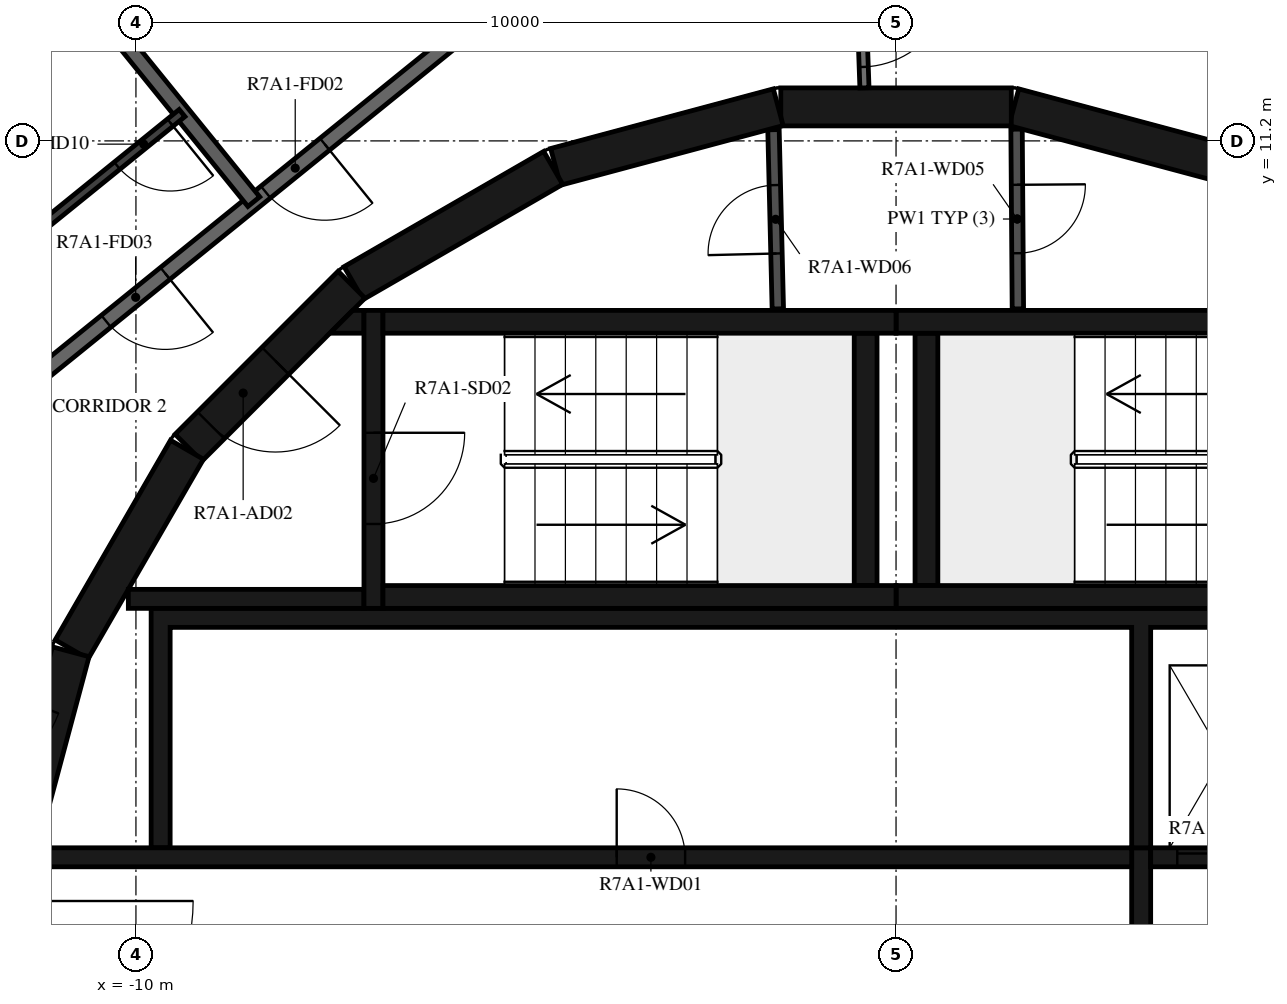
"""IFC4 building model, lengths in metres.
Left out: names, types, materials, properties, quantities, classifications, styles, units other than length and angle.
Written with IfcOpenShell. Run it as: python <this file> out.ifc"""

import sys

from ifc_helpers import new_model, si_unit, direction, frame, frame_2d, origin, place, context, subcontext, project, spatial, polyline, rectangle, outline, extrude, element, fill, save


model = new_model("IFC4")
c1 = context("Model", 3, precision=1e-05, world=origin(), true_north=direction((0.0, 1.0)))
c2 = subcontext(c1, "Body", "Model", "MODEL_VIEW")
j1 = project(units=[si_unit("LENGTHUNIT", "METRE"), si_unit("PLANEANGLEUNIT", "RADIAN")], contexts=[c1])
p1 = place(None, origin())
s1 = spatial("IfcSite", under=j1, at=p1, CompositionType="ELEMENT")
p2 = place(p1, origin())
s2 = spatial("IfcBuilding", under=s1, at=p2, CompositionType="ELEMENT")
p3 = place(p2, frame((0.0, 0.0, 266.9)))
s3 = spatial("IfcBuildingStorey", under=s2, at=p3, CompositionType="ELEMENT", Elevation=266.9)
for number, where, z_axis, x_axis in (
    (1, (4.479, 10.858, 0.0), (0.0, 0.0, 1.0), (-0.966, 0.259, 0.0)),
    (2, (1.516, 11.647, 0.0), (0.0, 0.0, 1.0), (-1.0, 0.0, 0.0)),
    (3, (-1.55, 11.643, 0.0), (0.0, 0.0, 1.0), (-0.966, -0.259, 0.0)),
    (4, (-4.51, 10.845, 0.0), (0.0, 0.0, 1.0), (-0.866, -0.5, 0.0)),
):
    element("IfcWall", number, at=place(p3, frame(where, z_axis=z_axis, x_axis=x_axis)), inside=s3, PredefinedType="SHEAR", context=c2, shape_type="SweptSolid", body=[
        extrude(rectangle(XDim=3.033, YDim=0.5, at=frame_2d((1.516, 0.0))), origin(), (0.0, 0.0, 1.0), 3.12),
    ])
p4 = place(p3, frame((-7.164, 9.308, 0.0), z_axis=(0.0, 0.0, 1.0), x_axis=(-0.707106781187, -0.707106781187, 0.0)))
e5 = element("IfcWall", 5, at=p4, inside=s3, PredefinedType="SHEAR", context=c2, shape_type="SweptSolid", body=[
    extrude(rectangle(XDim=3.032, YDim=0.5, at=frame_2d((1.516, 0.0))), origin(), (0.0, 0.0, 1.0), 3.12),
])
p5 = place(p4, frame((1.416, 0.0, 0.0)))
e6 = element("IfcOpeningElement", 6, at=p5, cuts=e5, PredefinedType="OPENING", context=c2, shape_type="SweptSolid", body=[
    extrude(rectangle(XDim=1.2, YDim=2.1, at=frame_2d((0.6, 1.05))), frame((0.0, 0.26, 0.0), z_axis=(0.0, -1.0, 0.0), x_axis=(1.0, 0.0, 0.0)), (0.0, 0.0, 1.0), 0.52),
])
for number, where, z_axis, x_axis in (
    (7, (-9.329, 7.137, 0.0), (0.0, 0.0, 1.0), (-0.5, -0.866, 0.0)),
    (8, (-10.858, 4.479, 0.0), (0.0, 0.0, 1.0), (-0.259, -0.966, 0.0)),
):
    element("IfcWall", number, at=place(p3, frame(where, z_axis=z_axis, x_axis=x_axis)), inside=s3, PredefinedType="SHEAR", context=c2, shape_type="SweptSolid", body=[
        extrude(rectangle(XDim=3.033, YDim=0.5, at=frame_2d((1.516, 0.0))), origin(), (0.0, 0.0, 1.0), 3.12),
    ])
for number, where, z_axis, x_axis in (
    (9, (0.0, 5.2, 0.0), (0.0, 0.0, 1.0), (1.0, 0.0, 0.0)),
    (10, (0.0, 8.82, 0.0), (0.0, 0.0, 1.0), (1.0, 0.0, 0.0)),
):
    element("IfcWall", number, at=place(p3, frame(where, z_axis=z_axis, x_axis=x_axis)), inside=s3, PredefinedType="SHEAR", context=c2, shape_type="SweptSolid", body=[
        extrude(rectangle(XDim=6.75, YDim=0.3, at=frame_2d((3.375, 0.0))), origin(), (0.0, 0.0, 1.0), 3.12),
    ])
p6 = place(p3, frame((0.4, 5.35, 0.0), z_axis=(0.0, 0.0, 1.0), x_axis=(0.0, 1.0, 0.0)))
e11 = element("IfcWall", 11, at=p6, inside=s3, PredefinedType="SHEAR", context=c2, shape_type="SweptSolid", body=[
    extrude(rectangle(XDim=3.32, YDim=0.3, at=frame_2d((1.66, 0.0))), origin(), (0.0, 0.0, 1.0), 3.12),
])
for number, where, z_axis, x_axis in (
    (12, (-6.75, 5.2, 0.0), (0.0, 0.0, 1.0), (1.0, 0.0, 0.0)),
    (13, (-6.75, 8.82, 0.0), (0.0, 0.0, 1.0), (1.0, 0.0, 0.0)),
):
    element("IfcWall", number, at=place(p3, frame(where, z_axis=z_axis, x_axis=x_axis)), inside=s3, PredefinedType="SHEAR", context=c2, shape_type="SweptSolid", body=[
        extrude(rectangle(XDim=6.75, YDim=0.3, at=frame_2d((3.375, 0.0))), origin(), (0.0, 0.0, 1.0), 3.12),
    ])
p7 = place(p3, frame((-0.4, 5.35, 0.0), z_axis=(0.0, 0.0, 1.0), x_axis=(0.0, 1.0, 0.0)))
e14 = element("IfcWall", 14, at=p7, inside=s3, PredefinedType="SHEAR", context=c2, shape_type="SweptSolid", body=[
    extrude(rectangle(XDim=3.32, YDim=0.3, at=frame_2d((1.66, 0.0))), origin(), (0.0, 0.0, 1.0), 3.12),
])
p8 = place(p3, frame((-6.875, 8.97, 0.0), z_axis=(0.0, 0.0, 1.0), x_axis=(0.0, -1.0, 0.0)))
e15 = element("IfcWall", 15, at=p8, inside=s3, PredefinedType="SHEAR", context=c2, shape_type="SweptSolid", body=[
    extrude(rectangle(XDim=3.92, YDim=0.25, at=frame_2d((1.96, 0.0))), origin(), (0.0, 0.0, 1.0), 3.12),
])
p9 = place(p8, frame((1.61, 0.0, 0.0)))
e16 = element("IfcOpeningElement", 16, at=p9, cuts=e15, PredefinedType="OPENING", context=c2, shape_type="SweptSolid", body=[
    extrude(rectangle(XDim=1.2, YDim=2.1, at=frame_2d((0.6, 1.05))), frame((0.0, 0.135, 0.0), z_axis=(0.0, -1.0, 0.0), x_axis=(1.0, 0.0, 0.0)), (0.0, 0.0, 1.0), 0.27),
])
p10 = place(p3, frame((-7.0, 5.175, 0.0), z_axis=(0.0, 0.0, 1.0), x_axis=(-1.0, 0.0, 0.0)))
e17 = element("IfcWall", 17, at=p10, inside=s3, PredefinedType="SHEAR", context=c2, shape_type="SweptSolid", body=[
    extrude(rectangle(XDim=3.1, YDim=0.25, at=frame_2d((1.55, 0.0))), origin(), (0.0, 0.0, 1.0), 3.12),
])
p11 = place(p3, origin())
e18 = element("IfcWall", 18, at=p11, inside=s3, PredefinedType="SHEAR", context=c2, shape_type="SweptSolid", body=[
    extrude(outline(polyline([(-7.148, 8.97), (-7.0, 8.97), (-7.0, 8.67), (-7.448, 8.67), (-7.148, 8.97)])), origin(), (0.0, 0.0, 1.0), 3.12),
])
p12 = place(p3, origin())
e19 = element("IfcWall", 19, at=p12, inside=s3, PredefinedType="SHEAR", context=c2, shape_type="SweptSolid", body=[
    extrude(outline(polyline([(-9.8, 1.9), (-9.55, 1.9), (-9.55, 4.8), (3.1, 4.8), (3.1, 1.9), (3.35, 1.9), (3.35, 4.8), (5.25, 4.8), (5.25, 1.9), (5.5, 1.9), (5.5, 4.8), (7.4, 4.8), (7.4, 1.9), (7.65, 1.9), (7.65, 4.8), (9.55, 4.8), (9.55, 1.9), (9.8, 1.9), (9.8, 4.8), (9.8, 5.05), (-9.8, 5.05), (-9.8, 4.8), (-9.8, 1.9)])), origin(), (0.0, 0.0, 1.0), 3.12),
])
p13 = place(p3, frame((-11.28, 1.775, 0.0), z_axis=(0.0, 0.0, 1.0), x_axis=(1.0, 0.0, 0.0)))
e20 = element("IfcWall", 20, at=p13, inside=s3, PredefinedType="SHEAR", context=c2, shape_type="SweptSolid", body=[
    extrude(rectangle(XDim=14.38, YDim=0.25, at=frame_2d((7.19, 0.0))), origin(), (0.0, 0.0, 1.0), 3.12),
])
p14 = place(p13, frame((7.605, 0.0, 0.0)))
e21 = element("IfcOpeningElement", 21, at=p14, cuts=e20, PredefinedType="OPENING", context=c2, shape_type="SweptSolid", body=[
    extrude(rectangle(XDim=0.9, YDim=2.1, at=frame_2d((0.45, 1.05))), frame((0.0, 0.135, 0.0), z_axis=(0.0, -1.0, 0.0), x_axis=(1.0, 0.0, 0.0)), (0.0, 0.0, 1.0), 0.27),
])
p15 = place(p3, frame((3.35, 1.775, 0.0), z_axis=(0.0, 0.0, 1.0), x_axis=(1.0, 0.0, 0.0)))
e22 = element("IfcWall", 22, at=p15, inside=s3, PredefinedType="SHEAR", context=c2, shape_type="SweptSolid", body=[
    extrude(rectangle(XDim=7.93, YDim=0.25, at=frame_2d((3.965, 0.0))), origin(), (0.0, 0.0, 1.0), 3.12),
])
p16 = place(p15, frame((0.35, 0.0, 0.0)))
e23 = element("IfcOpeningElement", 23, at=p16, cuts=e22, PredefinedType="OPENING", context=c2, shape_type="SweptSolid", body=[
    extrude(rectangle(XDim=1.2, YDim=2.4, at=frame_2d((0.6, 1.2))), frame((0.0, 0.135, 0.0), z_axis=(0.0, -1.0, 0.0), x_axis=(1.0, 0.0, 0.0)), (0.0, 0.0, 1.0), 0.27),
])
p17 = place(p15, frame((2.5, 0.0, 0.0)))
e24 = element("IfcOpeningElement", 24, at=p17, cuts=e22, PredefinedType="OPENING", context=c2, shape_type="SweptSolid", body=[
    extrude(rectangle(XDim=1.2, YDim=2.4, at=frame_2d((0.6, 1.2))), frame((0.0, 0.135, 0.0), z_axis=(0.0, -1.0, 0.0), x_axis=(1.0, 0.0, 0.0)), (0.0, 0.0, 1.0), 0.27),
])
p18 = place(p15, frame((4.8, 0.0, 0.0)))
e25 = element("IfcOpeningElement", 25, at=p18, cuts=e22, PredefinedType="OPENING", context=c2, shape_type="SweptSolid", body=[
    extrude(rectangle(XDim=0.9, YDim=2.1, at=frame_2d((0.45, 1.05))), frame((0.0, 0.135, 0.0), z_axis=(0.0, -1.0, 0.0), x_axis=(1.0, 0.0, 0.0)), (0.0, 0.0, 1.0), 0.27),
])
p19 = place(p3, frame((3.225, -1.9, 0.0), z_axis=(0.0, 0.0, 1.0), x_axis=(0.0, 1.0, 0.0)))
e26 = element("IfcWall", 26, at=p19, inside=s3, PredefinedType="SHEAR", context=c2, shape_type="SweptSolid", body=[
    extrude(rectangle(XDim=3.8, YDim=0.25, at=frame_2d((1.9, 0.0))), origin(), (0.0, 0.0, 1.0), 3.12),
])
p20 = place(p3, frame((1.586, 11.354, 0.0), z_axis=(0.0, 0.0, 1.0), x_axis=(0.007227482881, -0.999973881405, 0.0)))
e27 = element("IfcWall", 27, at=p20, inside=s3, PredefinedType="PARTITIONING", context=c2, shape_type="SweptSolid", body=[
    extrude(rectangle(XDim=2.365, YDim=0.15, at=frame_2d((1.182, 0.0))), origin(), (0.0, 0.0, 1.0), 3.12),
])
p21 = place(p20, frame((0.732, 0.0, 0.0)))
e28 = element("IfcOpeningElement", 28, at=p21, cuts=e27, PredefinedType="OPENING", context=c2, shape_type="SweptSolid", body=[
    extrude(rectangle(XDim=0.9, YDim=2.1, at=frame_2d((0.45, 1.05))), frame((0.0, 0.085, 0.0), z_axis=(0.0, -1.0, 0.0), x_axis=(1.0, 0.0, 0.0)), (0.0, 0.0, 1.0), 0.17),
])
p22 = place(p3, frame((-1.555, 8.99, 0.0), z_axis=(0.0, 0.0, 1.0), x_axis=(-0.024125549686, 0.999708936567, 0.0)))
e29 = element("IfcWall", 29, at=p22, inside=s3, PredefinedType="PARTITIONING", context=c2, shape_type="SweptSolid", body=[
    extrude(rectangle(XDim=2.358, YDim=0.15, at=frame_2d((1.179, 0.0))), origin(), (0.0, 0.0, 1.0), 3.12),
])
p23 = place(p22, frame((0.729, 0.0, 0.0)))
e30 = element("IfcOpeningElement", 30, at=p23, cuts=e29, PredefinedType="OPENING", context=c2, shape_type="SweptSolid", body=[
    extrude(rectangle(XDim=0.9, YDim=2.1, at=frame_2d((0.45, 1.05))), frame((0.0, 0.085, 0.0), z_axis=(0.0, -1.0, 0.0), x_axis=(1.0, 0.0, 0.0)), (0.0, 0.0, 1.0), 0.17),
])
p24 = place(p3, frame((-0.471, 13.492, 0.0), z_axis=(0.0, 0.0, 1.0), x_axis=(0.034873173869, -0.999391745886, 0.0)))
e31 = element("IfcWall", 31, at=p24, inside=s3, PredefinedType="PARTITIONING", context=c2, shape_type="SweptSolid", body=[
    extrude(rectangle(XDim=1.596, YDim=0.12, at=frame_2d((0.798, 0.0))), origin(), (0.0, 0.0, 1.0), 3.12),
])
p25 = place(p24, frame((0.12, 0.0, 0.0)))
e32 = element("IfcOpeningElement", 32, at=p25, cuts=e31, PredefinedType="OPENING", context=c2, shape_type="SweptSolid", body=[
    extrude(rectangle(XDim=1.2, YDim=2.1, at=frame_2d((0.6, 1.05))), frame((0.0, 0.07, 0.0), z_axis=(0.0, -1.0, 0.0), x_axis=(1.0, 0.0, 0.0)), (0.0, 0.0, 1.0), 0.14),
])
p26 = place(p3, frame((8.154, 11.223, 0.0), z_axis=(0.0, 0.0, 1.0), x_axis=(-0.93359073609, 0.358341090983, 0.0)))
e33 = element("IfcWall", 33, at=p26, inside=s3, PredefinedType="STANDARD", context=c2, shape_type="SweptSolid", body=[
    extrude(rectangle(XDim=7.181, YDim=0.2, at=frame_2d((3.59, 0.0))), origin(), (0.0, 0.0, 1.0), 3.12),
])
p27 = place(p3, frame((-5.643, 12.673, 0.0), z_axis=(0.0, 0.0, 1.0), x_axis=(-0.777160148113, -0.629302871585, 0.0)))
e34 = element("IfcWall", 34, at=p27, inside=s3, PredefinedType="STANDARD", context=c2, shape_type="SweptSolid", body=[
    extrude(rectangle(XDim=7.181, YDim=0.2, at=frame_2d((3.59, 0.0))), origin(), (0.0, 0.0, 1.0), 3.12),
])
p28 = place(p27, frame((2.41, 0.0, 0.0)))
e35 = element("IfcOpeningElement", 35, at=p28, cuts=e34, PredefinedType="OPENING", context=c2, shape_type="SweptSolid", body=[
    extrude(rectangle(XDim=1.0, YDim=2.1, at=frame_2d((0.5, 1.05))), frame((0.0, 0.11, 0.0), z_axis=(0.0, -1.0, 0.0), x_axis=(1.0, 0.0, 0.0)), (0.0, 0.0, 1.0), 0.22),
])
p29 = place(p27, frame((5.112, 0.0, 0.0)))
e36 = element("IfcOpeningElement", 36, at=p29, cuts=e34, PredefinedType="OPENING", context=c2, shape_type="SweptSolid", body=[
    extrude(rectangle(XDim=1.0, YDim=2.1, at=frame_2d((0.5, 1.05))), frame((0.0, 0.11, 0.0), z_axis=(0.0, -1.0, 0.0), x_axis=(1.0, 0.0, 0.0)), (0.0, 0.0, 1.0), 0.22),
])
p30 = place(p3, frame((-10.796, 13.299, 0.0), z_axis=(0.0, 0.0, 1.0), x_axis=(0.629290499381, -0.777170166301, 0.0)))
e37 = element("IfcWall", 37, at=p30, inside=s3, PredefinedType="STANDARD", context=c2, shape_type="SweptSolid", body=[
    extrude(rectangle(XDim=3.729, YDim=0.2, at=frame_2d((1.865, 0.0))), origin(), (0.0, 0.0, 1.0), 3.12),
])
p31 = place(p3, frame((-9.393, 11.566, 0.0), z_axis=(0.0, 0.0, 1.0), x_axis=(-0.777100258587, -0.629376825205, 0.0)))
e38 = element("IfcWall", 38, at=p31, inside=s3, PredefinedType="PARTITIONING", context=c2, shape_type="SweptSolid", body=[
    extrude(rectangle(XDim=3.971, YDim=0.12, at=frame_2d((1.986, 0.0))), origin(), (0.0, 0.0, 1.0), 3.12),
])
p32 = place(p31, frame((0.2, 0.0, 0.0)))
e39 = element("IfcOpeningElement", 39, at=p32, cuts=e38, PredefinedType="OPENING", context=c2, shape_type="SweptSolid", body=[
    extrude(rectangle(XDim=0.9, YDim=2.1, at=frame_2d((0.45, 1.05))), frame((0.0, 0.07, 0.0), z_axis=(0.0, -1.0, 0.0), x_axis=(1.0, 0.0, 0.0)), (0.0, 0.0, 1.0), 0.14),
])
p33 = place(p9, origin())
e40 = element("IfcDoor", 40, at=p33, inside=s3, OperationType="SINGLE_SWING_LEFT", PredefinedType="DOOR", context=c2, shape_type="SweptSolid", body=[
    extrude(rectangle(XDim=1.2, YDim=2.1, at=frame_2d((0.6, 1.05))), frame((0.0, 0.025, 0.0), z_axis=(0.0, -1.0, 0.0), x_axis=(1.0, 0.0, 0.0)), (0.0, 0.0, 1.0), 0.05),
])
fill(e16, e40)
p34 = place(p5, origin())
e41 = element("IfcDoor", 41, at=p34, inside=s3, OperationType="SINGLE_SWING_RIGHT", PredefinedType="DOOR", context=c2, shape_type="SweptSolid", body=[
    extrude(rectangle(XDim=1.2, YDim=2.1, at=frame_2d((0.6, 1.05))), frame((0.0, 0.025, 0.0), z_axis=(0.0, -1.0, 0.0), x_axis=(1.0, 0.0, 0.0)), (0.0, 0.0, 1.0), 0.05),
])
fill(e6, e41)
p35 = place(p16, origin())
e42 = element("IfcDoor", 42, at=p35, inside=s3, OperationType="DOUBLE_DOOR_SLIDING", PredefinedType="DOOR", context=c2, shape_type="SweptSolid", body=[
    extrude(rectangle(XDim=1.2, YDim=2.4, at=frame_2d((0.6, 1.2))), frame((0.0, 0.025, 0.0), z_axis=(0.0, -1.0, 0.0), x_axis=(1.0, 0.0, 0.0)), (0.0, 0.0, 1.0), 0.05),
])
fill(e23, e42)
p36 = place(p14, origin())
e43 = element("IfcDoor", 43, at=p36, inside=s3, OperationType="SINGLE_SWING_LEFT", PredefinedType="DOOR", context=c2, shape_type="SweptSolid", body=[
    extrude(rectangle(XDim=0.9, YDim=2.1, at=frame_2d((0.45, 1.05))), frame((0.0, 0.025, 0.0), z_axis=(0.0, -1.0, 0.0), x_axis=(1.0, 0.0, 0.0)), (0.0, 0.0, 1.0), 0.05),
])
fill(e21, e43)
p37 = place(p21, origin())
e44 = element("IfcDoor", 44, at=p37, inside=s3, OperationType="SINGLE_SWING_LEFT", PredefinedType="DOOR", context=c2, shape_type="SweptSolid", body=[
    extrude(rectangle(XDim=0.9, YDim=2.1, at=frame_2d((0.45, 1.05))), frame((0.0, 0.025, 0.0), z_axis=(0.0, -1.0, 0.0), x_axis=(1.0, 0.0, 0.0)), (0.0, 0.0, 1.0), 0.05),
])
fill(e28, e44)
p38 = place(p23, origin())
e45 = element("IfcDoor", 45, at=p38, inside=s3, OperationType="SINGLE_SWING_RIGHT", PredefinedType="DOOR", context=c2, shape_type="SweptSolid", body=[
    extrude(rectangle(XDim=0.9, YDim=2.1, at=frame_2d((0.45, 1.05))), frame((0.0, 0.025, 0.0), z_axis=(0.0, -1.0, 0.0), x_axis=(1.0, 0.0, 0.0)), (0.0, 0.0, 1.0), 0.05),
])
fill(e30, e45)
p39 = place(p28, origin())
e46 = element("IfcDoor", 46, at=p39, inside=s3, OperationType="SINGLE_SWING_RIGHT", PredefinedType="DOOR", context=c2, shape_type="SweptSolid", body=[
    extrude(rectangle(XDim=1.0, YDim=2.1, at=frame_2d((0.5, 1.05))), frame((0.0, 0.025, 0.0), z_axis=(0.0, -1.0, 0.0), x_axis=(1.0, 0.0, 0.0)), (0.0, 0.0, 1.0), 0.05),
])
fill(e35, e46)
p40 = place(p29, origin())
e47 = element("IfcDoor", 47, at=p40, inside=s3, OperationType="SINGLE_SWING_LEFT", PredefinedType="DOOR", context=c2, shape_type="SweptSolid", body=[
    extrude(rectangle(XDim=1.0, YDim=2.1, at=frame_2d((0.5, 1.05))), frame((0.0, 0.025, 0.0), z_axis=(0.0, -1.0, 0.0), x_axis=(1.0, 0.0, 0.0)), (0.0, 0.0, 1.0), 0.05),
])
fill(e36, e47)
p41 = place(p32, origin())
e48 = element("IfcDoor", 48, at=p41, inside=s3, OperationType="SINGLE_SWING_LEFT", PredefinedType="DOOR", context=c2, shape_type="SweptSolid", body=[
    extrude(rectangle(XDim=0.9, YDim=2.1, at=frame_2d((0.45, 1.05))), frame((0.0, 0.025, 0.0), z_axis=(0.0, -1.0, 0.0), x_axis=(1.0, 0.0, 0.0)), (0.0, 0.0, 1.0), 0.05),
])
fill(e39, e48)
p42 = place(p25, origin())
e49 = element("IfcDoor", 49, at=p42, inside=s3, OperationType="DOUBLE_DOOR_SINGLE_SWING", PredefinedType="DOOR", context=c2, shape_type="SweptSolid", body=[
    extrude(rectangle(XDim=1.2, YDim=2.1, at=frame_2d((0.6, 1.05))), frame((0.0, 0.025, 0.0), z_axis=(0.0, -1.0, 0.0), x_axis=(1.0, 0.0, 0.0)), (0.0, 0.0, 1.0), 0.05),
])
fill(e32, e49)
save(model, sys.argv[1])
